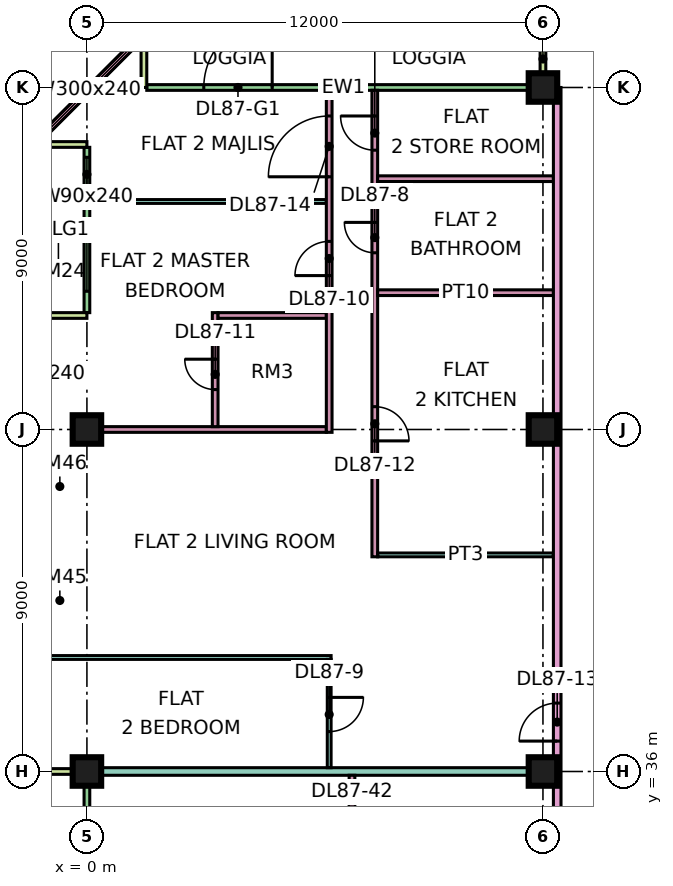
"""IFC4 building model, lengths in metres.
Left out: names, types, materials, properties, quantities, classifications, styles, units other than length and angle.
Written with IfcOpenShell. Run it as: python <this file> out.ifc"""

import sys

from ifc_helpers import new_model, si_unit, direction, frame, frame_2d, origin, origin_2d, place, context, subcontext, project, spatial, rectangle, extrude, element, fill, save


model = new_model("IFC4")
c1 = context("Model", 3, precision=1e-05, world=origin(), true_north=direction((0.0, 1.0)))
c2 = subcontext(c1, "Body", "Model", "MODEL_VIEW")
j1 = project(units=[si_unit("LENGTHUNIT", "METRE"), si_unit("PLANEANGLEUNIT", "RADIAN")], contexts=[c1])
p1 = place(None, origin())
s1 = spatial("IfcSite", under=j1, at=p1, CompositionType="ELEMENT")
p2 = place(p1, origin())
s2 = spatial("IfcBuilding", under=s1, at=p2, CompositionType="ELEMENT")
p3 = place(p2, frame((0.0, 0.0, 372.65)))
s3 = spatial("IfcBuildingStorey", under=s2, at=p3, CompositionType="ELEMENT", Elevation=372.65)
p4 = place(p3, frame((0.0, 36.0, 0.0), z_axis=(0.0, 0.0, 1.0), x_axis=(1.0, 0.0, 0.0)))
e1 = element("IfcColumn", 1, at=p4, inside=s3, PredefinedType="COLUMN", context=c2, shape_type="SweptSolid", body=[
    extrude(rectangle(XDim=0.75, YDim=0.75, at=origin_2d()), origin(), (0.0, 0.0, 1.0), 3.75),
])
p5 = place(p3, frame((0.0, 45.0, 0.0), z_axis=(0.0, 0.0, 1.0), x_axis=(1.0, 0.0, 0.0)))
e2 = element("IfcColumn", 2, at=p5, inside=s3, PredefinedType="COLUMN", context=c2, shape_type="SweptSolid", body=[
    extrude(rectangle(XDim=0.75, YDim=0.75, at=origin_2d()), origin(), (0.0, 0.0, 1.0), 3.75),
])
for number, where, z_axis, x_axis in (
    (3, (12.0, 36.0, 0.0), (0.0, 0.0, 1.0), (1.0, 0.0, 0.0)),
    (4, (12.0, 45.0, 0.0), (0.0, 0.0, 1.0), (1.0, 0.0, 0.0)),
    (5, (12.0, 54.0, 0.0), (0.0, 0.0, 1.0), (1.0, 0.0, 0.0)),
):
    element("IfcColumn", number, at=place(p3, frame(where, z_axis=z_axis, x_axis=x_axis)), inside=s3, PredefinedType="COLUMN", context=c2, shape_type="SweptSolid", body=[
        extrude(rectangle(XDim=0.75, YDim=0.75, at=origin_2d()), origin(), (0.0, 0.0, 1.0), 3.75),
    ])
p6 = place(p3, frame((11.925, 54.0, 0.0), z_axis=(0.0, 0.0, 1.0), x_axis=(-1.0, 0.0, 0.0)))
e6 = element("IfcWall", 6, at=p6, inside=s3, PredefinedType="SOLIDWALL", context=c2, shape_type="SweptSolid", body=[
    extrude(rectangle(XDim=10.35, YDim=0.15, at=frame_2d((5.175, 0.0))), origin(), (0.0, 0.0, 1.0), 3.35),
])
p7 = place(p6, frame((7.05, 0.0, 0.0)))
e7 = element("IfcOpeningElement", 7, at=p7, cuts=e6, PredefinedType="OPENING", context=c2, shape_type="SweptSolid", body=[
    extrude(rectangle(XDim=1.8, YDim=2.4, at=frame_2d((0.9, 1.2))), frame((0.0, 0.085, 0.0), z_axis=(0.0, -1.0, 0.0), x_axis=(1.0, 0.0, 0.0)), (0.0, 0.0, 1.0), 0.17),
])
for number, where, z_axis, x_axis in (
    (8, (12.0, 55.5, 0.0), (0.0, 0.0, 1.0), (0.0, -1.0, 0.0)),
    (9, (1.5, 55.5, 0.0), (0.0, 0.0, 1.0), (0.0, -1.0, 0.0)),
):
    element("IfcWall", number, at=place(p3, frame(where, z_axis=z_axis, x_axis=x_axis)), inside=s3, PredefinedType="SOLIDWALL", context=c2, shape_type="SweptSolid", body=[
        extrude(rectangle(XDim=1.5, YDim=0.15, at=frame_2d((0.75, 0.0))), origin(), (0.0, 0.0, 1.0), 3.35),
    ])
p8 = place(p3, frame((1.553, 55.447, 0.0), z_axis=(0.0, 0.0, 1.0), x_axis=(-0.707106781187, -0.707106781187, 0.0)))
e10 = element("IfcWall", 10, at=p8, inside=s3, PredefinedType="SOLIDWALL", context=c2, shape_type="SweptSolid", body=[
    extrude(rectangle(XDim=4.243, YDim=0.15, at=frame_2d((2.121, 0.0))), origin(), (0.0, 0.0, 1.0), 3.35),
])
p9 = place(p8, frame((0.621, 0.0, 0.45)))
e11 = element("IfcOpeningElement", 11, at=p9, cuts=e10, PredefinedType="OPENING", context=c2, shape_type="SweptSolid", body=[
    extrude(rectangle(XDim=3.0, YDim=2.4, at=frame_2d((1.5, 1.2))), frame((0.0, 0.085, 0.0), z_axis=(0.0, -1.0, 0.0), x_axis=(1.0, 0.0, 0.0)), (0.0, 0.0, 1.0), 0.17),
])
p10 = place(p3, frame((0.0, 52.425, 0.0), z_axis=(0.0, 0.0, 1.0), x_axis=(0.0, -1.0, 0.0)))
e12 = element("IfcWall", 12, at=p10, inside=s3, PredefinedType="SOLIDWALL", context=c2, shape_type="SweptSolid", body=[
    extrude(rectangle(XDim=4.35, YDim=0.15, at=frame_2d((2.175, 0.0))), origin(), (0.0, 0.0, 1.0), 3.35),
])
p11 = place(p10, frame((0.262, 0.0, 0.45)))
e13 = element("IfcOpeningElement", 13, at=p11, cuts=e12, PredefinedType="OPENING", context=c2, shape_type="SweptSolid", body=[
    extrude(rectangle(XDim=0.9, YDim=2.4, at=frame_2d((0.45, 1.2))), frame((0.0, 0.085, 0.0), z_axis=(0.0, -1.0, 0.0), x_axis=(1.0, 0.0, 0.0)), (0.0, 0.0, 1.0), 0.17),
])
p12 = place(p10, frame((1.988, 0.0, 0.45)))
e14 = element("IfcOpeningElement", 14, at=p12, cuts=e12, PredefinedType="OPENING", context=c2, shape_type="SweptSolid", body=[
    extrude(rectangle(XDim=1.8, YDim=2.4, at=frame_2d((0.9, 1.2))), frame((0.0, 0.085, 0.0), z_axis=(0.0, -1.0, 0.0), x_axis=(1.0, 0.0, 0.0)), (0.0, 0.0, 1.0), 0.17),
])
for number, where, z_axis, x_axis in (
    (15, (-1.5, 52.5, 0.0), (0.0, 0.0, 1.0), (1.0, 0.0, 0.0)),
    (16, (-1.5, 48.0, 0.0), (0.0, 0.0, 1.0), (1.0, 0.0, 0.0)),
):
    element("IfcWall", number, at=place(p3, frame(where, z_axis=z_axis, x_axis=x_axis)), inside=s3, PredefinedType="SOLIDWALL", context=c2, shape_type="SweptSolid", body=[
        extrude(rectangle(XDim=1.5, YDim=0.15, at=frame_2d((0.75, 0.0))), origin(), (0.0, 0.0, 1.0), 3.35),
    ])
p13 = place(p3, frame((0.0, 35.925, 0.0), z_axis=(0.0, 0.0, 1.0), x_axis=(0.0, -1.0, 0.0)))
e17 = element("IfcWall", 17, at=p13, inside=s3, PredefinedType="SOLIDWALL", context=c2, shape_type="SweptSolid", body=[
    extrude(rectangle(XDim=11.85, YDim=0.15, at=frame_2d((5.925, 0.0))), origin(), (0.0, 0.0, 1.0), 3.35),
])
p14 = place(p13, frame((2.262, 0.0, 0.0)))
e18 = element("IfcOpeningElement", 18, at=p14, cuts=e17, PredefinedType="OPENING", context=c2, shape_type="SweptSolid", body=[
    extrude(rectangle(XDim=1.8, YDim=2.4, at=frame_2d((0.9, 1.2))), frame((0.0, 0.085, 0.0), z_axis=(0.0, -1.0, 0.0), x_axis=(1.0, 0.0, 0.0)), (0.0, 0.0, 1.0), 0.17),
])
p15 = place(p13, frame((7.188, 0.0, 0.45)))
e19 = element("IfcOpeningElement", 19, at=p15, cuts=e17, PredefinedType="OPENING", context=c2, shape_type="SweptSolid", body=[
    extrude(rectangle(XDim=3.0, YDim=2.4, at=frame_2d((1.5, 1.2))), frame((0.0, 0.085, 0.0), z_axis=(0.0, -1.0, 0.0), x_axis=(1.0, 0.0, 0.0)), (0.0, 0.0, 1.0), 0.17),
])
p16 = place(p3, frame((-1.5, 36.0, 0.0), z_axis=(0.0, 0.0, 1.0), x_axis=(1.0, 0.0, 0.0)))
e20 = element("IfcWall", 20, at=p16, inside=s3, PredefinedType="SOLIDWALL", context=c2, shape_type="SweptSolid", body=[
    extrude(rectangle(XDim=1.5, YDim=0.15, at=frame_2d((0.75, 0.0))), origin(), (0.0, 0.0, 1.0), 3.35),
])
e21 = element("IfcWall", 21, at=p4, inside=s3, PredefinedType="PARTITIONING", context=c2, shape_type="SweptSolid", body=[
    extrude(rectangle(XDim=12.275, YDim=0.2, at=frame_2d((6.137, 0.0))), origin(), (0.0, 0.0, 1.0), 3.35),
])
p17 = place(p3, frame((-1.35, 39.0, 0.0), z_axis=(0.0, 0.0, 1.0), x_axis=(1.0, 0.0, 0.0)))
e22 = element("IfcWall", 22, at=p17, inside=s3, PredefinedType="PARTITIONING", context=c2, shape_type="SweptSolid", body=[
    extrude(rectangle(XDim=7.775, YDim=0.1, at=frame_2d((3.888, 0.0))), origin(), (0.0, 0.0, 1.0), 3.35),
])
e23 = element("IfcWall", 23, at=p5, inside=s3, PredefinedType="PARTITIONING", context=c2, shape_type="SweptSolid", body=[
    extrude(rectangle(XDim=6.3, YDim=0.15, at=frame_2d((3.15, 0.0))), origin(), (0.0, 0.0, 1.0), 3.35),
])
p18 = place(p3, frame((0.074, 51.0, 0.0), z_axis=(0.0, 0.0, 1.0), x_axis=(1.0, 0.0, 0.0)))
e24 = element("IfcWall", 24, at=p18, inside=s3, PredefinedType="PARTITIONING", context=c2, shape_type="SweptSolid", body=[
    extrude(rectangle(XDim=6.226, YDim=0.1, at=frame_2d((3.113, 0.0))), origin(), (0.0, 0.0, 1.0), 3.35),
])
p19 = place(p3, frame((3.375, 45.075, 0.0), z_axis=(0.0, 0.0, 1.0), x_axis=(0.0, 1.0, 0.0)))
e25 = element("IfcWall", 25, at=p19, inside=s3, PredefinedType="PARTITIONING", context=c2, shape_type="SweptSolid", body=[
    extrude(rectangle(XDim=3.0, YDim=0.15, at=frame_2d((1.5, 0.0))), origin(), (0.0, 0.0, 1.0), 3.35),
])
p20 = place(p19, frame((0.975, 0.0, 0.0)))
e26 = element("IfcOpeningElement", 26, at=p20, cuts=e25, PredefinedType="OPENING", context=c2, shape_type="SweptSolid", body=[
    extrude(rectangle(XDim=0.8, YDim=2.1, at=frame_2d((0.4, 1.05))), frame((0.0, 0.085, 0.0), z_axis=(0.0, -1.0, 0.0), x_axis=(1.0, 0.0, 0.0)), (0.0, 0.0, 1.0), 0.17),
])
p21 = place(p3, frame((3.45, 48.0, 0.0), z_axis=(0.0, 0.0, 1.0), x_axis=(1.0, 0.0, 0.0)))
e27 = element("IfcWall", 27, at=p21, inside=s3, PredefinedType="PARTITIONING", context=c2, shape_type="SweptSolid", body=[
    extrude(rectangle(XDim=2.85, YDim=0.15, at=frame_2d((1.425, 0.0))), origin(), (0.0, 0.0, 1.0), 3.35),
])
p22 = place(p3, frame((6.375, 36.1, 0.0), z_axis=(0.0, 0.0, 1.0), x_axis=(0.0, 1.0, 0.0)))
e28 = element("IfcWall", 28, at=p22, inside=s3, PredefinedType="PARTITIONING", context=c2, shape_type="SweptSolid", body=[
    extrude(rectangle(XDim=2.85, YDim=0.1, at=frame_2d((1.425, 0.0))), origin(), (0.0, 0.0, 1.0), 3.35),
])
p23 = place(p22, frame((0.95, 0.0, 0.0)))
e29 = element("IfcOpeningElement", 29, at=p23, cuts=e28, PredefinedType="OPENING", context=c2, shape_type="SweptSolid", body=[
    extrude(rectangle(XDim=0.9, YDim=2.1, at=frame_2d((0.45, 1.05))), frame((0.0, 0.06, 0.0), z_axis=(0.0, -1.0, 0.0), x_axis=(1.0, 0.0, 0.0)), (0.0, 0.0, 1.0), 0.12),
])
p24 = place(p3, frame((6.375, 44.925, 0.0), z_axis=(0.0, 0.0, 1.0), x_axis=(0.0, 1.0, 0.0)))
e30 = element("IfcWall", 30, at=p24, inside=s3, PredefinedType="PARTITIONING", context=c2, shape_type="SweptSolid", body=[
    extrude(rectangle(XDim=9.001, YDim=0.15, at=frame_2d((4.5, 0.0))), origin(), (0.0, 0.0, 1.0), 3.35),
])
p25 = place(p24, frame((4.125, 0.0, 0.0)))
e31 = element("IfcOpeningElement", 31, at=p25, cuts=e30, PredefinedType="OPENING", context=c2, shape_type="SweptSolid", body=[
    extrude(rectangle(XDim=0.9, YDim=2.1, at=frame_2d((0.45, 1.05))), frame((0.0, 0.085, 0.0), z_axis=(0.0, -1.0, 0.0), x_axis=(1.0, 0.0, 0.0)), (0.0, 0.0, 1.0), 0.17),
])
p26 = place(p24, frame((6.725, 0.0, 0.0)))
e32 = element("IfcOpeningElement", 32, at=p26, cuts=e30, PredefinedType="OPENING", context=c2, shape_type="SweptSolid", body=[
    extrude(rectangle(XDim=1.6, YDim=2.1, at=frame_2d((0.8, 1.05))), frame((0.0, 0.085, 0.0), z_axis=(0.0, -1.0, 0.0), x_axis=(1.0, 0.0, 0.0)), (0.0, 0.0, 1.0), 0.17),
])
p27 = place(p3, frame((6.975, 27.55, 0.0), z_axis=(0.0, 0.0, 1.0), x_axis=(0.0, 1.0, 0.0)))
e33 = element("IfcWall", 33, at=p27, inside=s3, PredefinedType="PARTITIONING", context=c2, shape_type="SweptSolid", body=[
    extrude(rectangle(XDim=8.35, YDim=0.15, at=frame_2d((4.175, 0.0))), origin(), (0.0, 0.0, 1.0), 3.35),
])
p28 = place(p27, frame((3.5, 0.0, 0.0)))
e34 = element("IfcOpeningElement", 34, at=p28, cuts=e33, PredefinedType="OPENING", context=c2, shape_type="SweptSolid", body=[
    extrude(rectangle(XDim=0.8, YDim=2.1, at=frame_2d((0.4, 1.05))), frame((0.0, 0.085, 0.0), z_axis=(0.0, -1.0, 0.0), x_axis=(1.0, 0.0, 0.0)), (0.0, 0.0, 1.0), 0.17),
])
p29 = place(p27, frame((0.95, 0.0, 0.0)))
e35 = element("IfcOpeningElement", 35, at=p29, cuts=e33, PredefinedType="OPENING", context=c2, shape_type="SweptSolid", body=[
    extrude(rectangle(XDim=0.9, YDim=2.1, at=frame_2d((0.45, 1.05))), frame((0.0, 0.085, 0.0), z_axis=(0.0, -1.0, 0.0), x_axis=(1.0, 0.0, 0.0)), (0.0, 0.0, 1.0), 0.17),
])
p30 = place(p27, frame((6.35, 0.0, 0.0)))
e36 = element("IfcOpeningElement", 36, at=p30, cuts=e33, PredefinedType="OPENING", context=c2, shape_type="SweptSolid", body=[
    extrude(rectangle(XDim=0.9, YDim=2.1, at=frame_2d((0.45, 1.05))), frame((0.0, 0.085, 0.0), z_axis=(0.0, -1.0, 0.0), x_axis=(1.0, 0.0, 0.0)), (0.0, 0.0, 1.0), 0.17),
])
p31 = place(p3, frame((7.575, 41.65, 0.0), z_axis=(0.0, 0.0, 1.0), x_axis=(0.0, 1.0, 0.0)))
e37 = element("IfcWall", 37, at=p31, inside=s3, PredefinedType="PARTITIONING", context=c2, shape_type="SweptSolid", body=[
    extrude(rectangle(XDim=12.276, YDim=0.15, at=frame_2d((6.138, 0.0))), origin(), (0.0, 0.0, 1.0), 3.35),
])
p32 = place(p31, frame((8.0, 0.0, 0.0)))
e38 = element("IfcOpeningElement", 38, at=p32, cuts=e37, PredefinedType="OPENING", context=c2, shape_type="SweptSolid", body=[
    extrude(rectangle(XDim=0.8, YDim=2.1, at=frame_2d((0.4, 1.05))), frame((0.0, 0.085, 0.0), z_axis=(0.0, -1.0, 0.0), x_axis=(1.0, 0.0, 0.0)), (0.0, 0.0, 1.0), 0.17),
])
p33 = place(p31, frame((3.05, 0.0, 0.0)))
e39 = element("IfcOpeningElement", 39, at=p33, cuts=e37, PredefinedType="OPENING", context=c2, shape_type="SweptSolid", body=[
    extrude(rectangle(XDim=0.9, YDim=2.1, at=frame_2d((0.45, 1.05))), frame((0.0, 0.085, 0.0), z_axis=(0.0, -1.0, 0.0), x_axis=(1.0, 0.0, 0.0)), (0.0, 0.0, 1.0), 0.17),
])
p34 = place(p31, frame((10.7, 0.0, 0.0)))
e40 = element("IfcOpeningElement", 40, at=p34, cuts=e37, PredefinedType="OPENING", context=c2, shape_type="SweptSolid", body=[
    extrude(rectangle(XDim=0.9, YDim=2.1, at=frame_2d((0.45, 1.05))), frame((0.0, 0.085, 0.0), z_axis=(0.0, -1.0, 0.0), x_axis=(1.0, 0.0, 0.0)), (0.0, 0.0, 1.0), 0.17),
])
p35 = place(p3, frame((7.65, 41.7, 0.0), z_axis=(0.0, 0.0, 1.0), x_axis=(1.0, 0.0, 0.0)))
e41 = element("IfcWall", 41, at=p35, inside=s3, PredefinedType="PARTITIONING", context=c2, shape_type="SweptSolid", body=[
    extrude(rectangle(XDim=4.625, YDim=0.1, at=frame_2d((2.312, 0.0))), origin(), (0.0, 0.0, 1.0), 3.35),
])
for number, where, z_axis, x_axis in (
    (42, (7.65, 48.6, 0.0), (0.0, 0.0, 1.0), (1.0, 0.0, 0.0)),
    (43, (7.65, 51.6, 0.0), (0.0, 0.0, 1.0), (1.0, 0.0, 0.0)),
):
    element("IfcWall", number, at=place(p3, frame(where, z_axis=z_axis, x_axis=x_axis)), inside=s3, PredefinedType="PARTITIONING", context=c2, shape_type="SweptSolid", body=[
        extrude(rectangle(XDim=4.625, YDim=0.15, at=frame_2d((2.312, 0.0))), origin(), (0.0, 0.0, 1.0), 3.35),
    ])
p36 = place(p3, frame((12.375, 20.0, 0.0), z_axis=(0.0, 0.0, 1.0), x_axis=(0.0, 1.0, 0.0)))
e44 = element("IfcWall", 44, at=p36, inside=s3, PredefinedType="PARTITIONING", context=c2, shape_type="SweptSolid", body=[
    extrude(rectangle(XDim=34.0, YDim=0.2, at=frame_2d((17.0, 0.0))), origin(), (0.0, 0.0, 1.0), 3.35),
])
p37 = place(p36, frame((16.8, 0.0, 0.0)))
e45 = element("IfcOpeningElement", 45, at=p37, cuts=e44, PredefinedType="OPENING", context=c2, shape_type="SweptSolid", body=[
    extrude(rectangle(XDim=1.0, YDim=2.1, at=frame_2d((0.5, 1.05))), frame((0.0, 0.11, 0.0), z_axis=(0.0, -1.0, 0.0), x_axis=(1.0, 0.0, 0.0)), (0.0, 0.0, 1.0), 0.22),
])
p38 = place(p36, frame((0.6, 0.0, 0.0)))
e46 = element("IfcOpeningElement", 46, at=p38, cuts=e44, PredefinedType="OPENING", context=c2, shape_type="SweptSolid", body=[
    extrude(rectangle(XDim=1.2, YDim=2.1, at=frame_2d((0.6, 1.05))), frame((0.0, 0.11, 0.0), z_axis=(0.0, -1.0, 0.0), x_axis=(1.0, 0.0, 0.0)), (0.0, 0.0, 1.0), 0.22),
])
p39 = place(p36, frame((4.5, 0.0, 0.0)))
e47 = element("IfcOpeningElement", 47, at=p39, cuts=e44, PredefinedType="OPENING", context=c2, shape_type="SweptSolid", body=[
    extrude(rectangle(XDim=1.0, YDim=2.1, at=frame_2d((0.5, 1.05))), frame((0.0, 0.11, 0.0), z_axis=(0.0, -1.0, 0.0), x_axis=(1.0, 0.0, 0.0)), (0.0, 0.0, 1.0), 0.22),
])
p40 = place(p7, frame((1.8, 0.0, 0.0), z_axis=(0.0, 0.0, 1.0), x_axis=(-1.0, 0.0, 0.0)))
e48 = element("IfcDoor", 48, at=p40, inside=s3, OperationType="DOUBLE_DOOR_SINGLE_SWING", PredefinedType="DOOR", context=c2, shape_type="SweptSolid", body=[
    extrude(rectangle(XDim=1.8, YDim=2.4, at=frame_2d((0.9, 1.2))), frame((0.0, 0.025, 0.0), z_axis=(0.0, -1.0, 0.0), x_axis=(1.0, 0.0, 0.0)), (0.0, 0.0, 1.0), 0.05),
])
fill(e7, e48)
p41 = place(p9, origin())
e49 = element("IfcWindow", 49, at=p41, inside=s3, PartitioningType="SINGLE_PANEL", PredefinedType="WINDOW", context=c2, shape_type="SweptSolid", body=[
    extrude(rectangle(XDim=3.0, YDim=2.4, at=frame_2d((1.5, 1.2))), frame((0.0, 0.03, 0.0), z_axis=(0.0, -1.0, 0.0), x_axis=(1.0, 0.0, 0.0)), (0.0, 0.0, 1.0), 0.06),
])
fill(e11, e49)
p42 = place(p11, origin())
e50 = element("IfcWindow", 50, at=p42, inside=s3, PartitioningType="SINGLE_PANEL", PredefinedType="WINDOW", context=c2, shape_type="SweptSolid", body=[
    extrude(rectangle(XDim=0.9, YDim=2.4, at=frame_2d((0.45, 1.2))), frame((0.0, 0.03, 0.0), z_axis=(0.0, -1.0, 0.0), x_axis=(1.0, 0.0, 0.0)), (0.0, 0.0, 1.0), 0.06),
])
fill(e13, e50)
p43 = place(p12, origin())
e51 = element("IfcWindow", 51, at=p43, inside=s3, PartitioningType="SINGLE_PANEL", PredefinedType="WINDOW", context=c2, shape_type="SweptSolid", body=[
    extrude(rectangle(XDim=1.8, YDim=2.4, at=frame_2d((0.9, 1.2))), frame((0.0, 0.03, 0.0), z_axis=(0.0, -1.0, 0.0), x_axis=(1.0, 0.0, 0.0)), (0.0, 0.0, 1.0), 0.06),
])
fill(e14, e51)
p44 = place(p32, frame((0.8, 0.0, 0.0), z_axis=(0.0, 0.0, 1.0), x_axis=(-1.0, 0.0, 0.0)))
e52 = element("IfcDoor", 52, at=p44, inside=s3, OperationType="SINGLE_SWING_RIGHT", PredefinedType="DOOR", context=c2, shape_type="SweptSolid", body=[
    extrude(rectangle(XDim=0.8, YDim=2.1, at=frame_2d((0.4, 1.05))), frame((0.0, 0.025, 0.0), z_axis=(0.0, -1.0, 0.0), x_axis=(1.0, 0.0, 0.0)), (0.0, 0.0, 1.0), 0.05),
])
fill(e38, e52)
p45 = place(p23, origin())
e53 = element("IfcDoor", 53, at=p45, inside=s3, OperationType="SINGLE_SWING_RIGHT", PredefinedType="DOOR", context=c2, shape_type="SweptSolid", body=[
    extrude(rectangle(XDim=0.9, YDim=2.1, at=frame_2d((0.45, 1.05))), frame((0.0, 0.025, 0.0), z_axis=(0.0, -1.0, 0.0), x_axis=(1.0, 0.0, 0.0)), (0.0, 0.0, 1.0), 0.05),
])
fill(e29, e53)
p46 = place(p25, origin())
e54 = element("IfcDoor", 54, at=p46, inside=s3, OperationType="SINGLE_SWING_LEFT", PredefinedType="DOOR", context=c2, shape_type="SweptSolid", body=[
    extrude(rectangle(XDim=0.9, YDim=2.1, at=frame_2d((0.45, 1.05))), frame((0.0, 0.025, 0.0), z_axis=(0.0, -1.0, 0.0), x_axis=(1.0, 0.0, 0.0)), (0.0, 0.0, 1.0), 0.05),
])
fill(e31, e54)
p47 = place(p20, frame((0.8, 0.0, 0.0), z_axis=(0.0, 0.0, 1.0), x_axis=(-1.0, 0.0, 0.0)))
e55 = element("IfcDoor", 55, at=p47, inside=s3, OperationType="SINGLE_SWING_RIGHT", PredefinedType="DOOR", context=c2, shape_type="SweptSolid", body=[
    extrude(rectangle(XDim=0.8, YDim=2.1, at=frame_2d((0.4, 1.05))), frame((0.0, 0.025, 0.0), z_axis=(0.0, -1.0, 0.0), x_axis=(1.0, 0.0, 0.0)), (0.0, 0.0, 1.0), 0.05),
])
fill(e26, e55)
p48 = place(p33, frame((0.9, 0.0, 0.0), z_axis=(0.0, 0.0, 1.0), x_axis=(-1.0, 0.0, 0.0)))
e56 = element("IfcDoor", 56, at=p48, inside=s3, OperationType="SINGLE_SWING_LEFT", PredefinedType="DOOR", context=c2, shape_type="SweptSolid", body=[
    extrude(rectangle(XDim=0.9, YDim=2.1, at=frame_2d((0.45, 1.05))), frame((0.0, 0.025, 0.0), z_axis=(0.0, -1.0, 0.0), x_axis=(1.0, 0.0, 0.0)), (0.0, 0.0, 1.0), 0.05),
])
fill(e39, e56)
p49 = place(p37, origin())
e57 = element("IfcDoor", 57, at=p49, inside=s3, OperationType="SINGLE_SWING_LEFT", PredefinedType="DOOR", context=c2, shape_type="SweptSolid", body=[
    extrude(rectangle(XDim=1.0, YDim=2.1, at=frame_2d((0.5, 1.05))), frame((0.0, 0.025, 0.0), z_axis=(0.0, -1.0, 0.0), x_axis=(1.0, 0.0, 0.0)), (0.0, 0.0, 1.0), 0.05),
])
fill(e45, e57)
p50 = place(p26, origin())
e58 = element("IfcDoor", 58, at=p50, inside=s3, OperationType="DOUBLE_DOOR_SINGLE_SWING", PredefinedType="DOOR", context=c2, shape_type="SweptSolid", body=[
    extrude(rectangle(XDim=1.6, YDim=2.1, at=frame_2d((0.8, 1.05))), frame((0.0, 0.025, 0.0), z_axis=(0.0, -1.0, 0.0), x_axis=(1.0, 0.0, 0.0)), (0.0, 0.0, 1.0), 0.05),
])
fill(e32, e58)
p51 = place(p34, frame((0.9, 0.0, 0.0), z_axis=(0.0, 0.0, 1.0), x_axis=(-1.0, 0.0, 0.0)))
e59 = element("IfcDoor", 59, at=p51, inside=s3, OperationType="SINGLE_SWING_RIGHT", PredefinedType="DOOR", context=c2, shape_type="SweptSolid", body=[
    extrude(rectangle(XDim=0.9, YDim=2.1, at=frame_2d((0.45, 1.05))), frame((0.0, 0.025, 0.0), z_axis=(0.0, -1.0, 0.0), x_axis=(1.0, 0.0, 0.0)), (0.0, 0.0, 1.0), 0.05),
])
fill(e40, e59)
save(model, sys.argv[1])
